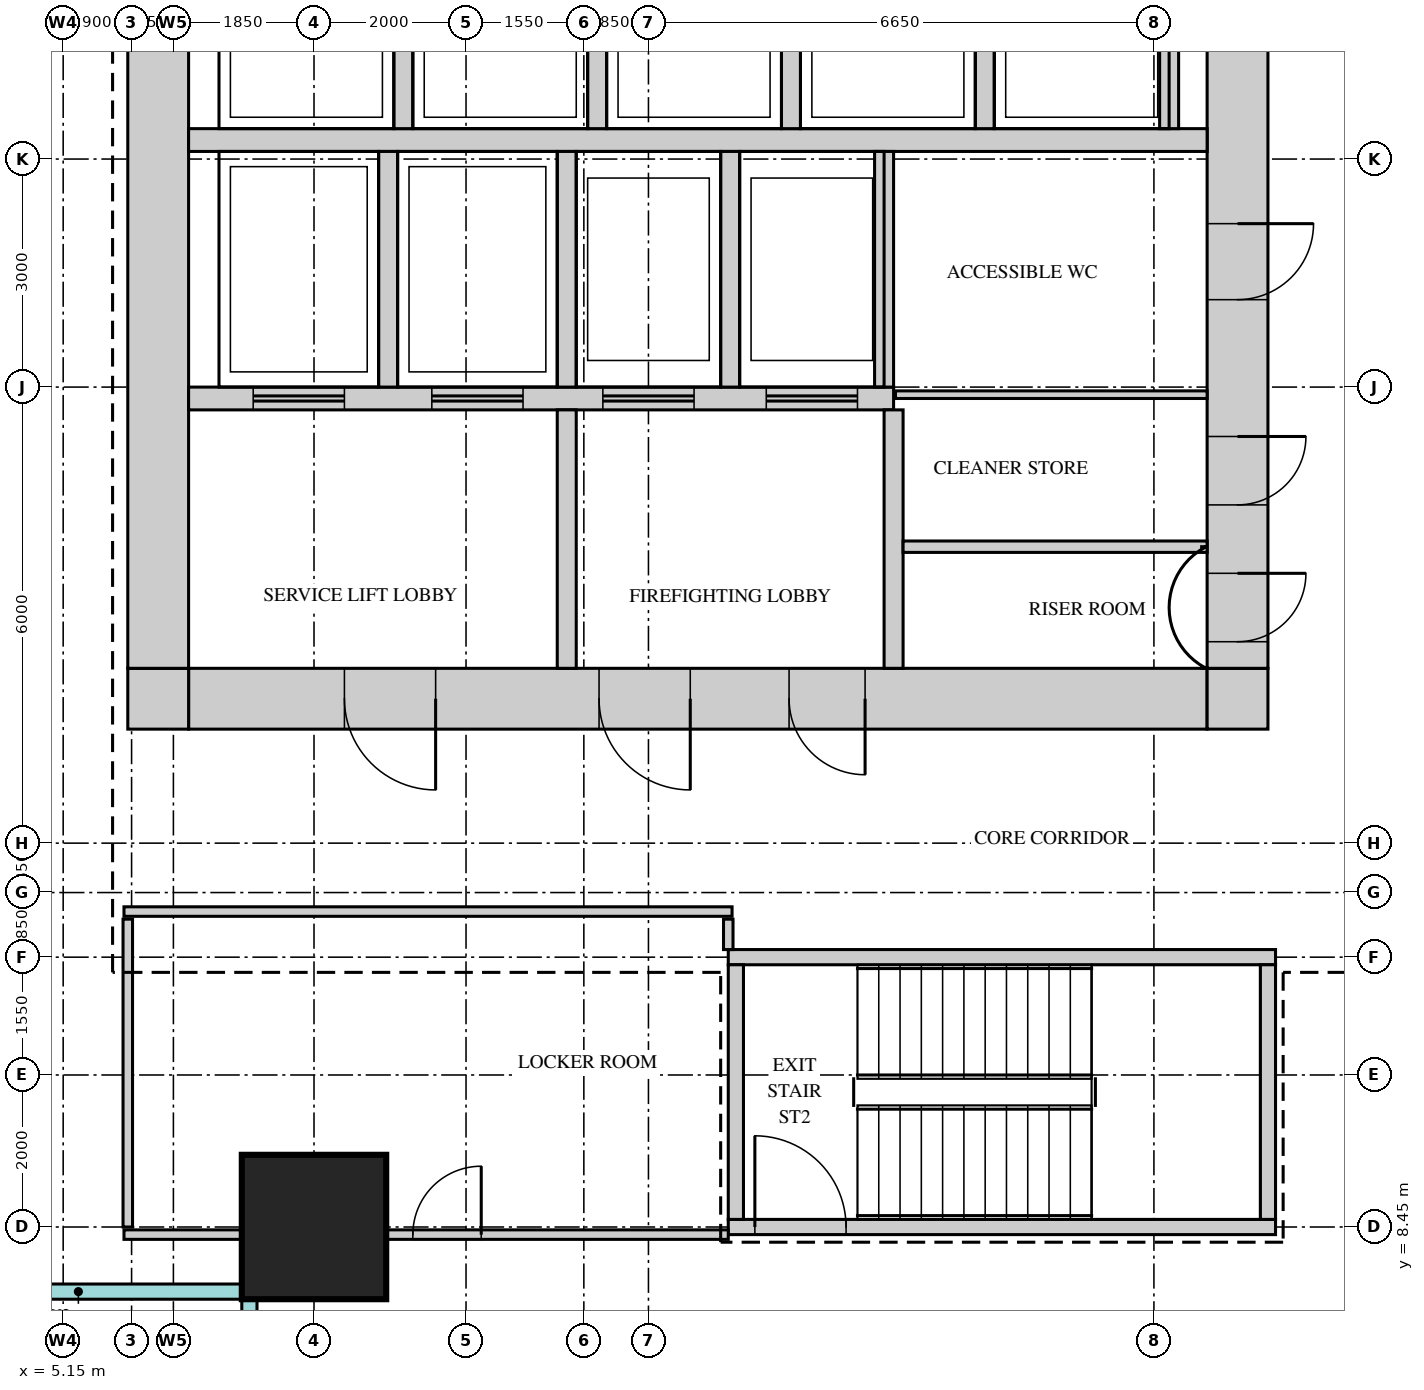
"""IFC4 building model, lengths in metres.
Left out: names, types, materials, properties, quantities, classifications, styles, units other than length and angle.
Written with IfcOpenShell. Run it as: python <this file> out.ifc"""

import sys

from ifc_helpers import new_model, si_unit, direction, frame, frame_2d, origin, origin_2d, place, context, subcontext, project, spatial, rectangle, extrude, source, transform, mapped, element, fill, save


model = new_model("IFC4")
c1 = context("Model", 3, precision=1e-05, world=origin(), true_north=direction((0.0, 1.0)))
c2 = subcontext(c1, "Body", "Model", "MODEL_VIEW")
j1 = project(units=[si_unit("LENGTHUNIT", "METRE"), si_unit("PLANEANGLEUNIT", "RADIAN")], contexts=[c1])
p1 = place(None, origin())
s1 = spatial("IfcSite", under=j1, at=p1, CompositionType="ELEMENT")
p2 = place(p1, origin())
s2 = spatial("IfcBuilding", under=s1, at=p2, CompositionType="ELEMENT")
p3 = place(p2, frame((0.0, 0.0, 196.7)))
s3 = spatial("IfcBuildingStorey", under=s2, at=p3, CompositionType="ELEMENT", Elevation=196.7)
m1 = source(origin(), c2, "Body", "SweptSolid", [
    extrude(rectangle(XDim=13.4, YDim=0.8, at=frame_2d((6.7, 0.0))), origin(), (0.0, 0.0, 1.0), 3.75),
])
p4 = place(p3, frame((6.8, 15.4, 0.0), z_axis=(0.0, 0.0, 1.0), x_axis=(1.0, 0.0, 0.0)))
e1 = element("IfcWall", 1, at=p4, inside=s3, PredefinedType="SHEAR", context=c2, shape_type="MappedRepresentation", body=[
    mapped(m1, transform((0.0, 0.0, 0.0))),
])
m2 = source(origin(), c2, "Body", "SweptSolid", [
    extrude(rectangle(XDim=1.2, YDim=2.1, at=frame_2d((0.6, 1.05))), frame((0.0, 0.41, 0.0), z_axis=(0.0, -1.0, 0.0), x_axis=(1.0, 0.0, 0.0)), (0.0, 0.0, 1.0), 0.82),
])
p5 = place(p4, frame((5.4, 0.0, 0.0)))
e2 = element("IfcOpeningElement", 2, at=p5, cuts=e1, PredefinedType="OPENING", context=c2, shape_type="MappedRepresentation", body=[
    mapped(m2, transform((0.0, 0.0, 0.0))),
])
p6 = place(p4, frame((2.05, 0.0, 0.0)))
e3 = element("IfcOpeningElement", 3, at=p6, cuts=e1, PredefinedType="OPENING", context=c2, shape_type="MappedRepresentation", body=[
    mapped(m2, transform((0.0, 0.0, 0.0))),
])
m3 = source(origin(), c2, "Body", "SweptSolid", [
    extrude(rectangle(XDim=1.0, YDim=2.1, at=frame_2d((0.5, 1.05))), frame((0.0, 0.41, 0.0), z_axis=(0.0, -1.0, 0.0), x_axis=(1.0, 0.0, 0.0)), (0.0, 0.0, 1.0), 0.82),
])
p7 = place(p4, frame((7.9, 0.0, 0.0)))
e4 = element("IfcOpeningElement", 4, at=p7, cuts=e1, PredefinedType="OPENING", context=c2, shape_type="MappedRepresentation", body=[
    mapped(m3, transform((0.0, 0.0, 0.0))),
])
m4 = source(origin(), c2, "Body", "SweptSolid", [
    extrude(rectangle(XDim=0.8, YDim=0.8, at=frame_2d((0.4, 0.0))), origin(), (0.0, 0.0, 1.0), 3.75),
])
for number, where, z_axis, x_axis in (
    (5, (20.2, 15.4, 0.0), (0.0, 0.0, 1.0), (1.0, 0.0, 0.0)),
    (6, (6.0, 15.4, 0.0), (0.0, 0.0, 1.0), (1.0, 0.0, 0.0)),
):
    element("IfcWall", number, at=place(p3, frame(where, z_axis=z_axis, x_axis=x_axis)), inside=s3, PredefinedType="SHEAR", context=c2, shape_type="MappedRepresentation", body=[
        mapped(m4, transform((0.0, 0.0, 0.0))),
    ])
m5 = source(origin(), c2, "Body", "SweptSolid", [
    extrude(rectangle(XDim=22.4, YDim=0.8, at=frame_2d((11.2, 0.0))), origin(), (0.0, 0.0, 1.0), 3.75),
])
p8 = place(p3, frame((20.6, 15.8, 0.0), z_axis=(0.0, 0.0, 1.0), x_axis=(0.0, 1.0, 0.0)))
e7 = element("IfcWall", 7, at=p8, inside=s3, PredefinedType="SHEAR", context=c2, shape_type="MappedRepresentation", body=[
    mapped(m5, transform((0.0, 0.0, 0.0))),
])
m6 = source(origin(), c2, "Body", "SweptSolid", [
    extrude(rectangle(XDim=1.8, YDim=2.1, at=frame_2d((0.9, 1.05))), frame((0.0, 0.41, 0.0), z_axis=(0.0, -1.0, 0.0), x_axis=(1.0, 0.0, 0.0)), (0.0, 0.0, 1.0), 0.82),
])
p9 = place(p8, frame((10.7, 0.0, 0.0)))
e8 = element("IfcOpeningElement", 8, at=p9, cuts=e7, PredefinedType="OPENING", context=c2, shape_type="MappedRepresentation", body=[
    mapped(m6, transform((0.0, 0.0, 0.0))),
])
m7 = source(origin(), c2, "Body", "SweptSolid", [
    extrude(rectangle(XDim=0.9, YDim=2.1, at=frame_2d((0.45, 1.05))), frame((0.0, 0.41, 0.0), z_axis=(0.0, -1.0, 0.0), x_axis=(1.0, 0.0, 0.0)), (0.0, 0.0, 1.0), 0.82),
])
p10 = place(p8, frame((0.35, 0.0, 0.0)))
e9 = element("IfcOpeningElement", 9, at=p10, cuts=e7, PredefinedType="OPENING", context=c2, shape_type="MappedRepresentation", body=[
    mapped(m7, transform((0.0, 0.0, 0.0))),
])
p11 = place(p8, frame((2.15, 0.0, 0.0)))
e10 = element("IfcOpeningElement", 10, at=p11, cuts=e7, PredefinedType="OPENING", context=c2, shape_type="MappedRepresentation", body=[
    mapped(m7, transform((0.0, 0.0, 0.0))),
])
p12 = place(p8, frame((4.85, 0.0, 0.0)))
e11 = element("IfcOpeningElement", 11, at=p12, cuts=e7, PredefinedType="OPENING", context=c2, shape_type="MappedRepresentation", body=[
    mapped(m3, transform((0.0, 0.0, 0.0))),
])
p13 = place(p3, frame((6.4, 15.8, 0.0), z_axis=(0.0, 0.0, 1.0), x_axis=(0.0, 1.0, 0.0)))
e12 = element("IfcWall", 12, at=p13, inside=s3, PredefinedType="SHEAR", context=c2, shape_type="MappedRepresentation", body=[
    mapped(m5, transform((0.0, 0.0, 0.0))),
])
m8 = source(origin(), c2, "Body", "SweptSolid", [
    extrude(rectangle(XDim=7.2, YDim=0.2, at=frame_2d((3.6, 0.0))), origin(), (0.0, 0.0, 1.0), 3.75),
])
p14 = place(p3, frame((13.9, 12.0, 0.0), z_axis=(0.0, 0.0, 1.0), x_axis=(1.0, 0.0, 0.0)))
e13 = element("IfcWall", 13, at=p14, inside=s3, PredefinedType="SHEAR", context=c2, shape_type="MappedRepresentation", body=[
    mapped(m8, transform((0.0, 0.0, 0.0))),
])
p15 = place(p3, frame((13.9, 8.45, 0.0), z_axis=(0.0, 0.0, 1.0), x_axis=(1.0, 0.0, 0.0)))
e14 = element("IfcWall", 14, at=p15, inside=s3, PredefinedType="SHEAR", context=c2, shape_type="MappedRepresentation", body=[
    mapped(m8, transform((0.0, 0.0, 0.0))),
])
m9 = source(origin(), c2, "Body", "SweptSolid", [
    extrude(rectangle(XDim=1.2, YDim=2.1, at=frame_2d((0.6, 1.05))), frame((0.0, 0.11, 0.0), z_axis=(0.0, -1.0, 0.0), x_axis=(1.0, 0.0, 0.0)), (0.0, 0.0, 1.0), 0.22),
])
p16 = place(p15, frame((0.35, 0.0, 0.0)))
e15 = element("IfcOpeningElement", 15, at=p16, cuts=e14, PredefinedType="OPENING", context=c2, shape_type="MappedRepresentation", body=[
    mapped(m9, transform((0.0, 0.0, 0.0))),
])
m10 = source(origin(), c2, "Body", "SweptSolid", [
    extrude(rectangle(XDim=3.35, YDim=0.2, at=frame_2d((1.675, 0.0))), origin(), (0.0, 0.0, 1.0), 3.75),
])
for number, where, z_axis, x_axis in (
    (16, (21.0, 8.55, 0.0), (0.0, 0.0, 1.0), (0.0, 1.0, 0.0)),
    (17, (14.0, 8.55, 0.0), (0.0, 0.0, 1.0), (0.0, 1.0, 0.0)),
):
    element("IfcWall", number, at=place(p3, frame(where, z_axis=z_axis, x_axis=x_axis)), inside=s3, PredefinedType="SHEAR", context=c2, shape_type="MappedRepresentation", body=[
        mapped(m10, transform((0.0, 0.0, 0.0))),
    ])
m11 = source(origin(), c2, "Body", "SweptSolid", [
    extrude(rectangle(XDim=13.4, YDim=0.3, at=frame_2d((6.7, 0.0))), origin(), (0.0, 0.0, 1.0), 3.75),
])
p17 = place(p3, frame((6.8, 22.75, 0.0), z_axis=(0.0, 0.0, 1.0), x_axis=(1.0, 0.0, 0.0)))
e18 = element("IfcWall", 18, at=p17, inside=s3, PredefinedType="STANDARD", context=c2, shape_type="MappedRepresentation", body=[
    mapped(m11, transform((0.0, 0.0, 0.0))),
])
m12 = source(origin(), c2, "Body", "SweptSolid", [
    extrude(rectangle(XDim=9.275, YDim=0.3, at=frame_2d((4.637, 0.0))), origin(), (0.0, 0.0, 1.0), 3.75),
])
p18 = place(p3, frame((6.8, 19.35, 0.0), z_axis=(0.0, 0.0, 1.0), x_axis=(1.0, 0.0, 0.0)))
e19 = element("IfcWall", 19, at=p18, inside=s3, PredefinedType="STANDARD", context=c2, shape_type="MappedRepresentation", body=[
    mapped(m12, transform((0.0, 0.0, 0.0))),
])
m13 = source(origin(), c2, "Body", "SweptSolid", [
    extrude(rectangle(XDim=1.2, YDim=2.1, at=frame_2d((0.6, 1.05))), frame((0.0, 0.16, 0.0), z_axis=(0.0, -1.0, 0.0), x_axis=(1.0, 0.0, 0.0)), (0.0, 0.0, 1.0), 0.32),
])
p19 = place(p18, frame((0.85, 0.0, 0.0)))
e20 = element("IfcOpeningElement", 20, at=p19, cuts=e19, PredefinedType="OPENING", context=c2, shape_type="MappedRepresentation", body=[
    mapped(m13, transform((0.0, 0.0, 0.0))),
])
p20 = place(p18, frame((3.2, 0.0, 0.0)))
e21 = element("IfcOpeningElement", 21, at=p20, cuts=e19, PredefinedType="OPENING", context=c2, shape_type="MappedRepresentation", body=[
    mapped(m13, transform((0.0, 0.0, 0.0))),
])
p21 = place(p18, frame((5.45, 0.0, 0.0)))
e22 = element("IfcOpeningElement", 22, at=p21, cuts=e19, PredefinedType="OPENING", context=c2, shape_type="MappedRepresentation", body=[
    mapped(m13, transform((0.0, 0.0, 0.0))),
])
p22 = place(p18, frame((7.6, 0.0, 0.0)))
e23 = element("IfcOpeningElement", 23, at=p22, cuts=e19, PredefinedType="OPENING", context=c2, shape_type="MappedRepresentation", body=[
    mapped(m13, transform((0.0, 0.0, 0.0))),
])
m14 = source(origin(), c2, "Body", "SweptSolid", [
    extrude(rectangle(XDim=3.1, YDim=0.25, at=frame_2d((1.55, 0.0))), origin(), (0.0, 0.0, 1.0), 3.75),
])
for number, where, z_axis, x_axis in (
    (24, (9.425, 19.5, 0.0), (0.0, 0.0, 1.0), (0.0, 1.0, 0.0)),
    (25, (11.775, 19.5, 0.0), (0.0, 0.0, 1.0), (0.0, 1.0, 0.0)),
    (26, (13.925, 19.5, 0.0), (0.0, 0.0, 1.0), (0.0, 1.0, 0.0)),
    (27, (15.95, 19.5, 0.0), (0.0, 0.0, 1.0), (0.0, 1.0, 0.0)),
):
    element("IfcWall", number, at=place(p3, frame(where, z_axis=z_axis, x_axis=x_axis)), inside=s3, PredefinedType="STANDARD", context=c2, shape_type="MappedRepresentation", body=[
        mapped(m14, transform((0.0, 0.0, 0.0))),
    ])
m15 = source(origin(), c2, "Body", "SweptSolid", [
    extrude(rectangle(XDim=2.4, YDim=0.25, at=frame_2d((1.2, 0.0))), origin(), (0.0, 0.0, 1.0), 3.75),
])
for number, where, z_axis, x_axis in (
    (28, (17.275, 22.9, 0.0), (0.0, 0.0, 1.0), (0.0, 1.0, 0.0)),
    (29, (19.7, 22.9, 0.0), (0.0, 0.0, 1.0), (0.0, 1.0, 0.0)),
    (30, (9.625, 22.9, 0.0), (0.0, 0.0, 1.0), (0.0, 1.0, 0.0)),
    (31, (12.175, 22.9, 0.0), (0.0, 0.0, 1.0), (0.0, 1.0, 0.0)),
    (32, (14.725, 22.9, 0.0), (0.0, 0.0, 1.0), (0.0, 1.0, 0.0)),
):
    element("IfcWall", number, at=place(p3, frame(where, z_axis=z_axis, x_axis=x_axis)), inside=s3, PredefinedType="STANDARD", context=c2, shape_type="MappedRepresentation", body=[
        mapped(m15, transform((0.0, 0.0, 0.0))),
    ])
m16 = source(origin(), c2, "Body", "SweptSolid", [
    extrude(rectangle(XDim=3.4, YDim=0.25, at=frame_2d((1.7, 0.0))), origin(), (0.0, 0.0, 1.0), 3.75),
])
for number, where, z_axis, x_axis in (
    (33, (16.075, 15.8, 0.0), (0.0, 0.0, 1.0), (0.0, 1.0, 0.0)),
    (34, (11.775, 15.8, 0.0), (0.0, 0.0, 1.0), (0.0, 1.0, 0.0)),
):
    element("IfcWall", number, at=place(p3, frame(where, z_axis=z_axis, x_axis=x_axis)), inside=s3, PredefinedType="STANDARD", context=c2, shape_type="MappedRepresentation", body=[
        mapped(m16, transform((0.0, 0.0, 0.0))),
    ])
m17 = source(origin(), c2, "Body", "SweptSolid", [
    extrude(rectangle(XDim=1.9, YDim=1.9, at=origin_2d()), origin(), (0.0, 0.0, 1.0), 4.0),
])
p23 = place(p3, frame((8.45, 8.45, 0.0), z_axis=(0.0, 0.0, 1.0), x_axis=(1.0, 0.0, 0.0)))
e35 = element("IfcColumn", 35, at=p23, inside=s3, PredefinedType="COLUMN", context=c2, shape_type="MappedRepresentation", body=[
    mapped(m17, transform((0.0, 0.0, 0.0))),
])
m18 = source(origin(), c2, "Body", "SweptSolid", [
    extrude(rectangle(XDim=7.95, YDim=0.125, at=frame_2d((3.975, 0.0))), origin(), (0.0, 0.0, 1.0), 3.25),
])
p24 = place(p3, frame((5.95, 8.35, 0.0), z_axis=(0.0, 0.0, 1.0), x_axis=(1.0, 0.0, 0.0)))
e36 = element("IfcWall", 36, at=p24, inside=s3, PredefinedType="PARTITIONING", context=c2, shape_type="MappedRepresentation", body=[
    mapped(m18, transform((0.0, 0.0, 0.0))),
])
m19 = source(origin(), c2, "Body", "SweptSolid", [
    extrude(rectangle(XDim=0.9, YDim=2.1, at=frame_2d((0.45, 1.05))), frame((0.0, 0.073, 0.0), z_axis=(0.0, -1.0, 0.0), x_axis=(1.0, 0.0, 0.0)), (0.0, 0.0, 1.0), 0.145),
])
p25 = place(p24, frame((3.8, 0.0, 0.0)))
e37 = element("IfcOpeningElement", 37, at=p25, cuts=e36, PredefinedType="OPENING", context=c2, shape_type="MappedRepresentation", body=[
    mapped(m19, transform((0.0, 0.0, 0.0))),
])
m20 = source(origin(), c2, "Body", "SweptSolid", [
    extrude(rectangle(XDim=4.05, YDim=0.125, at=frame_2d((2.025, 0.0))), origin(), (0.0, 0.0, 1.0), 3.8),
])
p26 = place(p3, frame((6.0, 8.45, 0.0), z_axis=(0.0, 0.0, 1.0), x_axis=(0.0, 1.0, 0.0)))
e38 = element("IfcWall", 38, at=p26, inside=s3, PredefinedType="PARTITIONING", context=c2, shape_type="MappedRepresentation", body=[
    mapped(m20, transform((0.0, 0.0, 0.0))),
])
m21 = source(origin(), c2, "Body", "SweptSolid", [
    extrude(rectangle(XDim=0.4, YDim=0.125, at=frame_2d((0.2, 0.0))), origin(), (0.0, 0.0, 1.0), 3.8),
])
p27 = place(p3, frame((13.9, 12.1, 0.0), z_axis=(0.0, 0.0, 1.0), x_axis=(0.0, 1.0, 0.0)))
e39 = element("IfcWall", 39, at=p27, inside=s3, PredefinedType="PARTITIONING", context=c2, shape_type="MappedRepresentation", body=[
    mapped(m21, transform((0.0, 0.0, 0.0))),
])
m22 = source(origin(), c2, "Body", "SweptSolid", [
    extrude(rectangle(XDim=8.0, YDim=0.125, at=frame_2d((4.0, 0.0))), origin(), (0.0, 0.0, 1.0), 3.8),
])
p28 = place(p3, frame((5.95, 12.6, 0.0), z_axis=(0.0, 0.0, 1.0), x_axis=(1.0, 0.0, 0.0)))
e40 = element("IfcWall", 40, at=p28, inside=s3, PredefinedType="PARTITIONING", context=c2, shape_type="MappedRepresentation", body=[
    mapped(m22, transform((0.0, 0.0, 0.0))),
])
m23 = source(origin(), c2, "Body", "SweptSolid", [
    extrude(rectangle(XDim=4.0, YDim=0.15, at=frame_2d((2.0, 0.0))), origin(), (0.0, 0.0, 1.0), 3.8),
])
p29 = place(p3, frame((16.2, 17.4, 0.0), z_axis=(0.0, 0.0, 1.0), x_axis=(1.0, 0.0, 0.0)))
e41 = element("IfcWall", 41, at=p29, inside=s3, PredefinedType="PARTITIONING", context=c2, shape_type="MappedRepresentation", body=[
    mapped(m23, transform((0.0, 0.0, 0.0))),
])
m24 = source(origin(), c2, "Body", "SweptSolid", [
    extrude(rectangle(XDim=4.1, YDim=0.1, at=frame_2d((2.05, 0.0))), origin(), (0.0, 0.0, 1.0), 3.8),
])
p30 = place(p3, frame((16.1, 19.4, 0.0), z_axis=(0.0, 0.0, 1.0), x_axis=(1.0, 0.0, 0.0)))
e42 = element("IfcWall", 42, at=p30, inside=s3, PredefinedType="PARTITIONING", context=c2, shape_type="MappedRepresentation", body=[
    mapped(m24, transform((0.0, 0.0, 0.0))),
])
m25 = source(origin(), c2, "Body", "SweptSolid", [
    extrude(rectangle(XDim=0.9, YDim=2.1, at=frame_2d((0.45, 1.05))), frame((0.0, 0.35, 0.0), z_axis=(0.0, -1.0, 0.0), x_axis=(1.0, 0.0, 0.0)), (0.0, 0.0, 1.0), 0.7),
])
p31 = place(p10, origin())
e43 = element("IfcDoor", 43, at=p31, inside=s3, OperationType="SINGLE_SWING_RIGHT", PredefinedType="DOOR", context=c2, shape_type="MappedRepresentation", body=[
    mapped(m25, transform((0.0, 0.0, 0.0))),
])
fill(e9, e43)
p32 = place(p11, origin())
e44 = element("IfcDoor", 44, at=p32, inside=s3, OperationType="SINGLE_SWING_RIGHT", PredefinedType="DOOR", context=c2, shape_type="MappedRepresentation", body=[
    mapped(m25, transform((0.0, 0.0, 0.0))),
])
fill(e10, e44)
m26 = source(origin(), c2, "Body", "SweptSolid", [
    extrude(rectangle(XDim=1.0, YDim=2.1, at=frame_2d((0.5, 1.05))), frame((0.0, 0.35, 0.0), z_axis=(0.0, -1.0, 0.0), x_axis=(1.0, 0.0, 0.0)), (0.0, 0.0, 1.0), 0.7),
])
p33 = place(p12, origin())
e45 = element("IfcDoor", 45, at=p33, inside=s3, OperationType="SINGLE_SWING_RIGHT", PredefinedType="DOOR", context=c2, shape_type="MappedRepresentation", body=[
    mapped(m26, transform((0.0, 0.0, 0.0))),
])
fill(e11, e45)
m27 = source(origin(), c2, "Body", "SweptSolid", [
    extrude(rectangle(XDim=1.2, YDim=2.1, at=frame_2d((0.6, 1.05))), frame((0.0, 0.35, 0.0), z_axis=(0.0, -1.0, 0.0), x_axis=(1.0, 0.0, 0.0)), (0.0, 0.0, 1.0), 0.7),
])
p34 = place(p5, origin())
e46 = element("IfcDoor", 46, at=p34, inside=s3, OperationType="SINGLE_SWING_RIGHT", PredefinedType="DOOR", context=c2, shape_type="MappedRepresentation", body=[
    mapped(m27, transform((0.0, 0.0, 0.0))),
])
fill(e2, e46)
p35 = place(p6, origin())
e47 = element("IfcDoor", 47, at=p35, inside=s3, OperationType="SINGLE_SWING_RIGHT", PredefinedType="DOOR", context=c2, shape_type="MappedRepresentation", body=[
    mapped(m27, transform((0.0, 0.0, 0.0))),
])
fill(e3, e47)
p36 = place(p7, origin())
e48 = element("IfcDoor", 48, at=p36, inside=s3, OperationType="SINGLE_SWING_RIGHT", PredefinedType="DOOR", context=c2, shape_type="MappedRepresentation", body=[
    mapped(m26, transform((0.0, 0.0, 0.0))),
])
fill(e4, e48)
m28 = source(origin(), c2, "Body", "SweptSolid", [
    extrude(rectangle(XDim=0.9, YDim=2.1, at=frame_2d((0.45, 1.05))), frame((0.0, 0.025, 0.0), z_axis=(0.0, -1.0, 0.0), x_axis=(1.0, 0.0, 0.0)), (0.0, 0.0, 1.0), 0.05),
])
p37 = place(p25, origin())
e49 = element("IfcDoor", 49, at=p37, inside=s3, OperationType="SINGLE_SWING_LEFT", PredefinedType="DOOR", context=c2, shape_type="MappedRepresentation", body=[
    mapped(m28, transform((0.0, 0.0, 0.0))),
])
fill(e37, e49)
m29 = source(origin(), c2, "Body", "SweptSolid", [
    extrude(rectangle(XDim=1.2, YDim=2.1, at=frame_2d((0.6, 1.05))), frame((0.0, 0.025, 0.0), z_axis=(0.0, -1.0, 0.0), x_axis=(1.0, 0.0, 0.0)), (0.0, 0.0, 1.0), 0.05),
])
p38 = place(p16, origin())
e50 = element("IfcDoor", 50, at=p38, inside=s3, OperationType="SINGLE_SWING_RIGHT", PredefinedType="DOOR", context=c2, shape_type="MappedRepresentation", body=[
    mapped(m29, transform((0.0, 0.0, 0.0))),
])
fill(e15, e50)
p39 = place(p19, origin())
e51 = element("IfcDoor", 51, at=p39, inside=s3, OperationType="DOUBLE_DOOR_SLIDING", PredefinedType="DOOR", context=c2, shape_type="MappedRepresentation", body=[
    mapped(m29, transform((0.0, 0.0, 0.0))),
])
fill(e20, e51)
p40 = place(p20, origin())
e52 = element("IfcDoor", 52, at=p40, inside=s3, OperationType="DOUBLE_DOOR_SLIDING", PredefinedType="DOOR", context=c2, shape_type="MappedRepresentation", body=[
    mapped(m29, transform((0.0, 0.0, 0.0))),
])
fill(e21, e52)
p41 = place(p21, origin())
e53 = element("IfcDoor", 53, at=p41, inside=s3, OperationType="DOUBLE_DOOR_SLIDING", PredefinedType="DOOR", context=c2, shape_type="MappedRepresentation", body=[
    mapped(m29, transform((0.0, 0.0, 0.0))),
])
fill(e22, e53)
p42 = place(p22, origin())
e54 = element("IfcDoor", 54, at=p42, inside=s3, OperationType="DOUBLE_DOOR_SLIDING", PredefinedType="DOOR", context=c2, shape_type="MappedRepresentation", body=[
    mapped(m29, transform((0.0, 0.0, 0.0))),
])
fill(e23, e54)
save(model, sys.argv[1])
